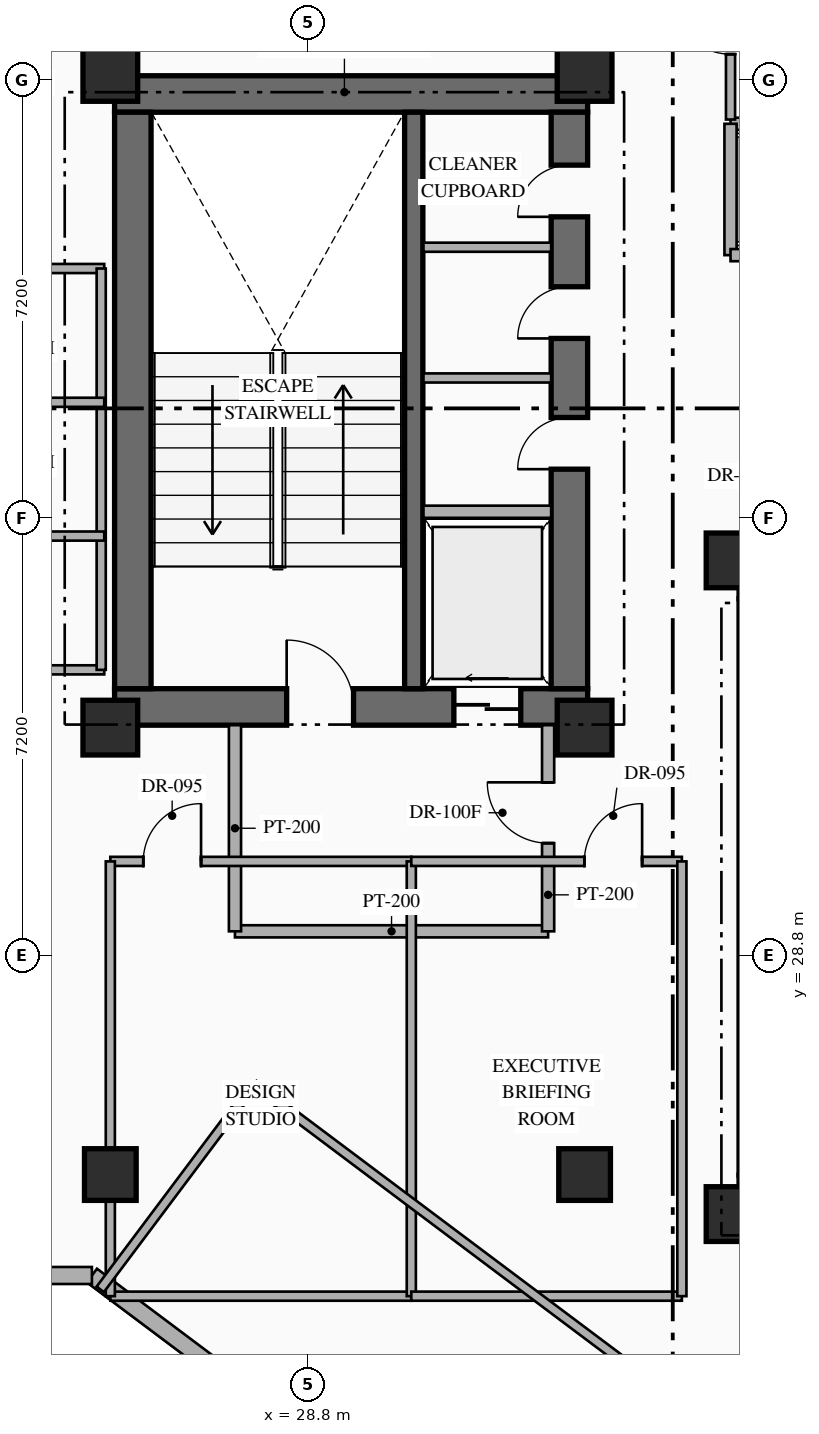
"""IFC4 building model, lengths in metres.
Left out: names, types, materials, properties, quantities, classifications, styles, units other than length and angle.
Written with IfcOpenShell. Run it as: python <this file> out.ifc"""

import sys

from ifc_helpers import new_model, si_unit, direction, frame, frame_2d, origin, origin_2d, place, context, subcontext, project, spatial, rectangle, hollow_rectangle, extrude, element, fill, save


model = new_model("IFC4")
c1 = context("Model", 3, precision=1e-05, world=origin(), true_north=direction((0.0, 1.0)))
c2 = subcontext(c1, "Body", "Model", "MODEL_VIEW")
j1 = project(units=[si_unit("LENGTHUNIT", "METRE"), si_unit("PLANEANGLEUNIT", "RADIAN")], contexts=[c1])
p1 = place(None, origin())
s1 = spatial("IfcSite", under=j1, at=p1, CompositionType="ELEMENT")
p2 = place(p1, origin())
s2 = spatial("IfcBuilding", under=s1, at=p2, CompositionType="ELEMENT")
p3 = place(p2, frame((0.0, 0.0, 149.25)))
s3 = spatial("IfcBuildingStorey", under=s2, at=p3, CompositionType="ELEMENT", Elevation=149.25)
p4 = place(p3, frame((25.62, 32.89, 0.0), z_axis=(0.0, 0.0, 1.0), x_axis=(1.0, 0.0, 0.0)))
e1 = element("IfcWall", 1, at=p4, inside=s3, PredefinedType="SHEAR", context=c2, shape_type="SweptSolid", body=[
    extrude(rectangle(XDim=7.78, YDim=0.6, at=frame_2d((3.89, 0.0))), origin(), (0.0, 0.0, 1.0), 3.6),
])
p5 = place(p4, frame((2.83, 0.0, 0.0)))
e2 = element("IfcOpeningElement", 2, at=p5, cuts=e1, PredefinedType="OPENING", context=c2, shape_type="SweptSolid", body=[
    extrude(rectangle(XDim=1.1, YDim=2.2, at=frame_2d((0.55, 1.1))), frame((0.0, 0.31, 0.0), z_axis=(0.0, -1.0, 0.0), x_axis=(1.0, 0.0, 0.0)), (0.0, 0.0, 1.0), 0.62),
])
p6 = place(p4, frame((5.58, 0.0, 0.0)))
e3 = element("IfcOpeningElement", 3, at=p6, cuts=e1, PredefinedType="OPENING", context=c2, shape_type="SweptSolid", body=[
    extrude(rectangle(XDim=1.1, YDim=2.15, at=frame_2d((0.55, 1.075))), frame((0.0, 0.31, 0.0), z_axis=(0.0, -1.0, 0.0), x_axis=(1.0, 0.0, 0.0)), (0.0, 0.0, 1.0), 0.62),
])
p7 = place(p3, frame((25.62, 42.97, 0.0), z_axis=(0.0, 0.0, 1.0), x_axis=(1.0, 0.0, 0.0)))
e4 = element("IfcWall", 4, at=p7, inside=s3, PredefinedType="SHEAR", context=c2, shape_type="SweptSolid", body=[
    extrude(rectangle(XDim=7.78, YDim=0.6, at=frame_2d((3.89, 0.0))), origin(), (0.0, 0.0, 1.0), 3.6),
])
p8 = place(p3, frame((25.92, 33.19, 0.0), z_axis=(0.0, 0.0, 1.0), x_axis=(0.0, 1.0, 0.0)))
e5 = element("IfcWall", 5, at=p8, inside=s3, PredefinedType="SHEAR", context=c2, shape_type="SweptSolid", body=[
    extrude(rectangle(XDim=9.48, YDim=0.6, at=frame_2d((4.74, 0.0))), origin(), (0.0, 0.0, 1.0), 3.6),
])
p9 = place(p3, frame((33.1, 33.19, 0.0), z_axis=(0.0, 0.0, 1.0), x_axis=(0.0, 1.0, 0.0)))
e6 = element("IfcWall", 6, at=p9, inside=s3, PredefinedType="SHEAR", context=c2, shape_type="SweptSolid", body=[
    extrude(rectangle(XDim=9.48, YDim=0.6, at=frame_2d((4.74, 0.0))), origin(), (0.0, 0.0, 1.0), 3.6),
])
p10 = place(p9, frame((3.61, 0.0, 0.0)))
e7 = element("IfcOpeningElement", 7, at=p10, cuts=e6, PredefinedType="OPENING", context=c2, shape_type="SweptSolid", body=[
    extrude(rectangle(XDim=0.85, YDim=2.08, at=frame_2d((0.425, 1.04))), frame((0.0, 0.31, 0.0), z_axis=(0.0, -1.0, 0.0), x_axis=(1.0, 0.0, 0.0)), (0.0, 0.0, 1.0), 0.62),
])
p11 = place(p9, frame((5.76, 0.0, 0.0)))
e8 = element("IfcOpeningElement", 8, at=p11, cuts=e6, PredefinedType="OPENING", context=c2, shape_type="SweptSolid", body=[
    extrude(rectangle(XDim=0.85, YDim=2.08, at=frame_2d((0.425, 1.04))), frame((0.0, 0.31, 0.0), z_axis=(0.0, -1.0, 0.0), x_axis=(1.0, 0.0, 0.0)), (0.0, 0.0, 1.0), 0.62),
])
p12 = place(p9, frame((7.76, 0.0, 0.0)))
e9 = element("IfcOpeningElement", 9, at=p12, cuts=e6, PredefinedType="OPENING", context=c2, shape_type="SweptSolid", body=[
    extrude(rectangle(XDim=0.85, YDim=2.08, at=frame_2d((0.425, 1.04))), frame((0.0, 0.31, 0.0), z_axis=(0.0, -1.0, 0.0), x_axis=(1.0, 0.0, 0.0)), (0.0, 0.0, 1.0), 0.62),
])
p13 = place(p3, frame((30.54, 33.19, 0.0), z_axis=(0.0, 0.0, 1.0), x_axis=(0.0, 1.0, 0.0)))
e10 = element("IfcWall", 10, at=p13, inside=s3, PredefinedType="SHEAR", context=c2, shape_type="SweptSolid", body=[
    extrude(rectangle(XDim=9.48, YDim=0.3, at=frame_2d((4.74, 0.0))), origin(), (0.0, 0.0, 1.0), 3.6),
])
p14 = place(p3, frame((35.89, 24.89, 0.0), z_axis=(0.0, 0.0, 1.0), x_axis=(1.0, 0.0, 0.0)))
e11 = element("IfcWall", 11, at=p14, inside=s3, PredefinedType="SHEAR", context=c2, shape_type="SweptSolid", body=[
    extrude(rectangle(XDim=7.76, YDim=0.6, at=frame_2d((3.88, 0.0))), origin(), (0.0, 0.0, 1.0), 3.6),
])
p15 = place(p3, frame((35.89, 34.97, 0.0), z_axis=(0.0, 0.0, 1.0), x_axis=(1.0, 0.0, 0.0)))
e12 = element("IfcWall", 12, at=p15, inside=s3, PredefinedType="SHEAR", context=c2, shape_type="SweptSolid", body=[
    extrude(rectangle(XDim=7.76, YDim=0.6, at=frame_2d((3.88, 0.0))), origin(), (0.0, 0.0, 1.0), 3.6),
])
p16 = place(p15, frame((2.66, 0.0, 0.0)))
e13 = element("IfcOpeningElement", 13, at=p16, cuts=e12, PredefinedType="OPENING", context=c2, shape_type="SweptSolid", body=[
    extrude(rectangle(XDim=1.1, YDim=2.2, at=frame_2d((0.55, 1.1))), frame((0.0, 0.31, 0.0), z_axis=(0.0, -1.0, 0.0), x_axis=(1.0, 0.0, 0.0)), (0.0, 0.0, 1.0), 0.62),
])
p17 = place(p15, frame((5.56, 0.0, 0.0)))
e14 = element("IfcOpeningElement", 14, at=p17, cuts=e12, PredefinedType="OPENING", context=c2, shape_type="SweptSolid", body=[
    extrude(rectangle(XDim=1.12, YDim=2.15, at=frame_2d((0.56, 1.075))), frame((0.0, 0.31, 0.0), z_axis=(0.0, -1.0, 0.0), x_axis=(1.0, 0.0, 0.0)), (0.0, 0.0, 1.0), 0.62),
])
p18 = place(p3, frame((36.19, 25.19, 0.0), z_axis=(0.0, 0.0, 1.0), x_axis=(0.0, 1.0, 0.0)))
e15 = element("IfcWall", 15, at=p18, inside=s3, PredefinedType="SHEAR", context=c2, shape_type="SweptSolid", body=[
    extrude(rectangle(XDim=9.48, YDim=0.6, at=frame_2d((4.74, 0.0))), origin(), (0.0, 0.0, 1.0), 3.6),
])
for number, where, z_axis, x_axis in (
    (16, (25.55, 32.55, 0.0), (0.0, 0.0, 1.0), (1.0, 0.0, 0.0)),
    (17, (33.35, 32.55, 0.0), (0.0, 0.0, 1.0), (1.0, 0.0, 0.0)),
    (18, (25.55, 43.3, 0.0), (0.0, 0.0, 1.0), (1.0, 0.0, 0.0)),
    (19, (33.35, 43.3, 0.0), (0.0, 0.0, 1.0), (1.0, 0.0, 0.0)),
    (20, (35.8, 24.55, 0.0), (0.0, 0.0, 1.0), (1.0, 0.0, 0.0)),
    (21, (35.8, 35.3, 0.0), (0.0, 0.0, 1.0), (1.0, 0.0, 0.0)),
):
    element("IfcColumn", number, at=place(p3, frame(where, z_axis=z_axis, x_axis=x_axis)), inside=s3, PredefinedType="COLUMN", context=c2, shape_type="SweptSolid", body=[
        extrude(rectangle(XDim=0.9, YDim=0.9, at=origin_2d()), origin(), (0.0, 0.0, 1.0), 3.6),
    ])
for number, where, z_axis, x_axis in (
    (22, (25.55, 25.2, 0.0), (0.0, 0.0, 1.0), (1.0, 0.0, 0.0)),
    (23, (33.35, 25.2, 0.0), (0.0, 0.0, 1.0), (1.0, 0.0, 0.0)),
):
    element("IfcColumn", number, at=place(p3, frame(where, z_axis=z_axis, x_axis=x_axis)), inside=s3, PredefinedType="COLUMN", context=c2, shape_type="SweptSolid", body=[
        extrude(hollow_rectangle(XDim=0.85, YDim=0.85, WallThickness=0.032, at=origin_2d()), origin(), (0.0, 0.0, 1.0), 3.6),
    ])
p19 = place(p3, frame((44.918, 8.787, 0.0), z_axis=(0.0, 0.0, 1.0), x_axis=(-0.800004765927, 0.599993645378, 0.0)))
e24 = element("IfcWall", 24, at=p19, inside=s3, PredefinedType="STANDARD", context=c2, shape_type="SweptSolid", body=[
    extrude(rectangle(XDim=24.588, YDim=0.28, at=frame_2d((12.294, 0.0))), origin(), (0.0, 0.0, 1.0), 3.35),
])
p20 = place(p3, frame((25.247, 23.54, 0.0), z_axis=(0.0, 0.0, 1.0), x_axis=(-1.0, 0.0, 0.0)))
e25 = element("IfcWall", 25, at=p20, inside=s3, PredefinedType="STANDARD", context=c2, shape_type="SweptSolid", body=[
    extrude(rectangle(XDim=6.747, YDim=0.28, at=frame_2d((3.374, 0.0))), origin(), (0.0, 0.0, 1.0), 3.35),
])
p21 = place(p3, frame((30.7, 36.1, 0.0), z_axis=(0.0, 0.0, 1.0), x_axis=(1.0, 0.0, 0.0)))
e26 = element("IfcWall", 26, at=p21, inside=s3, PredefinedType="STANDARD", context=c2, shape_type="SweptSolid", body=[
    extrude(rectangle(XDim=2.1, YDim=0.2, at=frame_2d((1.05, 0.0))), origin(), (0.0, 0.0, 1.0), 3.35),
])
for number, where, z_axis, x_axis in (
    (27, (30.7, 38.3, 0.0), (0.0, 0.0, 1.0), (1.0, 0.0, 0.0)),
    (28, (30.7, 40.45, 0.0), (0.0, 0.0, 1.0), (1.0, 0.0, 0.0)),
):
    element("IfcWall", number, at=place(p3, frame(where, z_axis=z_axis, x_axis=x_axis)), inside=s3, PredefinedType="PARTITIONING", context=c2, shape_type="SweptSolid", body=[
        extrude(rectangle(XDim=2.1, YDim=0.15, at=frame_2d((1.05, 0.0))), origin(), (0.0, 0.0, 1.0), 3.35),
    ])
p22 = place(p3, frame((27.6, 29.2, 0.0), z_axis=(0.0, 0.0, 1.0), x_axis=(1.0, 0.0, 0.0)))
e29 = element("IfcWall", 29, at=p22, inside=s3, PredefinedType="STANDARD", context=c2, shape_type="SweptSolid", body=[
    extrude(rectangle(XDim=5.15, YDim=0.2, at=frame_2d((2.575, 0.0))), origin(), (0.0, 0.0, 1.0), 3.35),
])
p23 = place(p3, frame((27.6, 29.2, 0.0), z_axis=(0.0, 0.0, 1.0), x_axis=(0.0, 1.0, 0.0)))
e30 = element("IfcWall", 30, at=p23, inside=s3, PredefinedType="STANDARD", context=c2, shape_type="SweptSolid", body=[
    extrude(rectangle(XDim=3.39, YDim=0.2, at=frame_2d((1.695, 0.0))), origin(), (0.0, 0.0, 1.0), 3.35),
])
p24 = place(p3, frame((32.75, 29.2, 0.0), z_axis=(0.0, 0.0, 1.0), x_axis=(0.0, 1.0, 0.0)))
e31 = element("IfcWall", 31, at=p24, inside=s3, PredefinedType="STANDARD", context=c2, shape_type="SweptSolid", body=[
    extrude(rectangle(XDim=3.39, YDim=0.2, at=frame_2d((1.695, 0.0))), origin(), (0.0, 0.0, 1.0), 3.35),
])
p25 = place(p24, frame((1.45, 0.0, 0.0)))
e32 = element("IfcOpeningElement", 32, at=p25, cuts=e31, PredefinedType="OPENING", context=c2, shape_type="SweptSolid", body=[
    extrude(rectangle(XDim=1.0, YDim=2.2, at=frame_2d((0.5, 1.1))), frame((0.0, 0.11, 0.0), z_axis=(0.0, -1.0, 0.0), x_axis=(1.0, 0.0, 0.0)), (0.0, 0.0, 1.0), 0.22),
])
p26 = place(p3, frame((35.75, 42.48, 0.0), z_axis=(0.0, 0.0, 1.0), x_axis=(1.0, 0.0, 0.0)))
e33 = element("IfcWall", 33, at=p26, inside=s3, PredefinedType="STANDARD", context=c2, shape_type="SweptSolid", body=[
    extrude(rectangle(XDim=9.11, YDim=0.2, at=frame_2d((4.555, 0.0))), origin(), (0.0, 0.0, 1.0), 3.35),
])
p27 = place(p3, frame((35.75, 40.32, 0.0), z_axis=(0.0, 0.0, 1.0), x_axis=(0.0, 1.0, 0.0)))
e34 = element("IfcWall", 34, at=p27, inside=s3, PredefinedType="STANDARD", context=c2, shape_type="SweptSolid", body=[
    extrude(rectangle(XDim=2.16, YDim=0.2, at=frame_2d((1.08, 0.0))), origin(), (0.0, 0.0, 1.0), 3.35),
])
p28 = place(p3, frame((35.75, 40.32, 0.0), z_axis=(0.0, 0.0, 1.0), x_axis=(1.0, 0.0, 0.0)))
e35 = element("IfcWall", 35, at=p28, inside=s3, PredefinedType="STANDARD", context=c2, shape_type="SweptSolid", body=[
    extrude(rectangle(XDim=9.11, YDim=0.2, at=frame_2d((4.555, 0.0))), origin(), (0.0, 0.0, 1.0), 3.35),
])
p29 = place(p28, frame((0.53, 0.0, 0.0)))
e36 = element("IfcOpeningElement", 36, at=p29, cuts=e35, PredefinedType="OPENING", context=c2, shape_type="SweptSolid", body=[
    extrude(rectangle(XDim=1.1, YDim=2.18, at=frame_2d((0.55, 1.09))), frame((0.0, 0.11, 0.0), z_axis=(0.0, -1.0, 0.0), x_axis=(1.0, 0.0, 0.0)), (0.0, 0.0, 1.0), 0.22),
])
p30 = place(p28, frame((2.73, 0.0, 0.0)))
e37 = element("IfcOpeningElement", 37, at=p30, cuts=e35, PredefinedType="OPENING", context=c2, shape_type="SweptSolid", body=[
    extrude(rectangle(XDim=1.1, YDim=2.18, at=frame_2d((0.55, 1.09))), frame((0.0, 0.11, 0.0), z_axis=(0.0, -1.0, 0.0), x_axis=(1.0, 0.0, 0.0)), (0.0, 0.0, 1.0), 0.22),
])
p31 = place(p28, frame((4.93, 0.0, 0.0)))
e38 = element("IfcOpeningElement", 38, at=p31, cuts=e35, PredefinedType="OPENING", context=c2, shape_type="SweptSolid", body=[
    extrude(rectangle(XDim=1.1, YDim=2.18, at=frame_2d((0.55, 1.09))), frame((0.0, 0.11, 0.0), z_axis=(0.0, -1.0, 0.0), x_axis=(1.0, 0.0, 0.0)), (0.0, 0.0, 1.0), 0.22),
])
p32 = place(p28, frame((7.13, 0.0, 0.0)))
e39 = element("IfcOpeningElement", 39, at=p32, cuts=e35, PredefinedType="OPENING", context=c2, shape_type="SweptSolid", body=[
    extrude(rectangle(XDim=1.1, YDim=2.18, at=frame_2d((0.55, 1.09))), frame((0.0, 0.11, 0.0), z_axis=(0.0, -1.0, 0.0), x_axis=(1.0, 0.0, 0.0)), (0.0, 0.0, 1.0), 0.22),
])
for number, where, z_axis, x_axis in (
    (40, (22.15, 33.5, 0.0), (0.0, 0.0, 1.0), (1.0, 0.0, 0.0)),
    (41, (22.15, 40.1, 0.0), (0.0, 0.0, 1.0), (1.0, 0.0, 0.0)),
):
    element("IfcWall", number, at=place(p3, frame(where, z_axis=z_axis, x_axis=x_axis)), inside=s3, PredefinedType="PARTITIONING", context=c2, shape_type="SweptSolid", body=[
        extrude(rectangle(XDim=3.3, YDim=0.15, at=frame_2d((1.65, 0.0))), origin(), (0.0, 0.0, 1.0), 3.35),
    ])
p33 = place(p3, frame((25.4, 33.5, 0.0), z_axis=(0.0, 0.0, 1.0), x_axis=(0.0, 1.0, 0.0)))
e42 = element("IfcWall", 42, at=p33, inside=s3, PredefinedType="PARTITIONING", context=c2, shape_type="SweptSolid", body=[
    extrude(rectangle(XDim=6.6, YDim=0.15, at=frame_2d((3.3, 0.0))), origin(), (0.0, 0.0, 1.0), 3.35),
])
for number, where, z_axis, x_axis in (
    (43, (22.15, 35.7, 0.0), (0.0, 0.0, 1.0), (1.0, 0.0, 0.0)),
    (44, (22.15, 37.9, 0.0), (0.0, 0.0, 1.0), (1.0, 0.0, 0.0)),
):
    element("IfcWall", number, at=place(p3, frame(where, z_axis=z_axis, x_axis=x_axis)), inside=s3, PredefinedType="PARTITIONING", context=c2, shape_type="SweptSolid", body=[
        extrude(rectangle(XDim=3.3, YDim=0.15, at=frame_2d((1.65, 0.0))), origin(), (0.0, 0.0, 1.0), 3.35),
    ])
p34 = place(p3, frame((25.55, 23.2, 0.0), z_axis=(0.0, 0.0, 1.0), x_axis=(1.0, 0.0, 0.0)))
e45 = element("IfcWall", 45, at=p34, inside=s3, PredefinedType="PARTITIONING", context=c2, shape_type="SweptSolid", body=[
    extrude(rectangle(XDim=4.95, YDim=0.15, at=frame_2d((2.475, 0.0))), origin(), (0.0, 0.0, 1.0), 3.35),
])
p35 = place(p3, frame((25.55, 30.35, 0.0), z_axis=(0.0, 0.0, 1.0), x_axis=(1.0, 0.0, 0.0)))
e46 = element("IfcWall", 46, at=p35, inside=s3, PredefinedType="PARTITIONING", context=c2, shape_type="SweptSolid", body=[
    extrude(rectangle(XDim=4.95, YDim=0.15, at=frame_2d((2.475, 0.0))), origin(), (0.0, 0.0, 1.0), 3.35),
])
p36 = place(p35, frame((0.542, 0.0, 0.0)))
e47 = element("IfcOpeningElement", 47, at=p36, cuts=e46, PredefinedType="OPENING", context=c2, shape_type="SweptSolid", body=[
    extrude(rectangle(XDim=0.95, YDim=2.15, at=frame_2d((0.475, 1.075))), frame((0.0, 0.085, 0.0), z_axis=(0.0, -1.0, 0.0), x_axis=(1.0, 0.0, 0.0)), (0.0, 0.0, 1.0), 0.17),
])
p37 = place(p3, frame((25.55, 23.2, 0.0), z_axis=(0.0, 0.0, 1.0), x_axis=(0.0, 1.0, 0.0)))
e48 = element("IfcWall", 48, at=p37, inside=s3, PredefinedType="PARTITIONING", context=c2, shape_type="SweptSolid", body=[
    extrude(rectangle(XDim=7.15, YDim=0.15, at=frame_2d((3.575, 0.0))), origin(), (0.0, 0.0, 1.0), 2.695),
])
p38 = place(p3, frame((30.5, 23.2, 0.0), z_axis=(0.0, 0.0, 1.0), x_axis=(0.0, 1.0, 0.0)))
e49 = element("IfcWall", 49, at=p38, inside=s3, PredefinedType="PARTITIONING", context=c2, shape_type="SweptSolid", body=[
    extrude(rectangle(XDim=7.15, YDim=0.15, at=frame_2d((3.575, 0.0))), origin(), (0.0, 0.0, 1.0), 3.35),
])
p39 = place(p3, frame((30.5, 23.2, 0.0), z_axis=(0.0, 0.0, 1.0), x_axis=(1.0, 0.0, 0.0)))
e50 = element("IfcWall", 50, at=p39, inside=s3, PredefinedType="PARTITIONING", context=c2, shape_type="SweptSolid", body=[
    extrude(rectangle(XDim=4.45, YDim=0.15, at=frame_2d((2.225, 0.0))), origin(), (0.0, 0.0, 1.0), 3.35),
])
p40 = place(p3, frame((30.5, 30.35, 0.0), z_axis=(0.0, 0.0, 1.0), x_axis=(1.0, 0.0, 0.0)))
e51 = element("IfcWall", 51, at=p40, inside=s3, PredefinedType="PARTITIONING", context=c2, shape_type="SweptSolid", body=[
    extrude(rectangle(XDim=4.45, YDim=0.15, at=frame_2d((2.225, 0.0))), origin(), (0.0, 0.0, 1.0), 3.35),
])
p41 = place(p40, frame((2.846, 0.0, 0.0)))
e52 = element("IfcOpeningElement", 52, at=p41, cuts=e51, PredefinedType="OPENING", context=c2, shape_type="SweptSolid", body=[
    extrude(rectangle(XDim=0.95, YDim=2.15, at=frame_2d((0.475, 1.075))), frame((0.0, 0.085, 0.0), z_axis=(0.0, -1.0, 0.0), x_axis=(1.0, 0.0, 0.0)), (0.0, 0.0, 1.0), 0.17),
])
p42 = place(p3, frame((34.95, 23.2, 0.0), z_axis=(0.0, 0.0, 1.0), x_axis=(0.0, 1.0, 0.0)))
e53 = element("IfcWall", 53, at=p42, inside=s3, PredefinedType="PARTITIONING", context=c2, shape_type="SweptSolid", body=[
    extrude(rectangle(XDim=7.15, YDim=0.15, at=frame_2d((3.575, 0.0))), origin(), (0.0, 0.0, 1.0), 3.35),
])
p43 = place(p3, frame((35.75, 42.55, 0.0), z_axis=(0.0, 0.0, 1.0), x_axis=(0.0, 1.0, 0.0)))
e54 = element("IfcWall", 54, at=p43, inside=s3, PredefinedType="PARTITIONING", context=c2, shape_type="SweptSolid", body=[
    extrude(rectangle(XDim=3.1, YDim=0.15, at=frame_2d((1.55, 0.0))), origin(), (0.0, 0.0, 1.0), 3.35),
])
p44 = place(p43, frame((1.075, 0.0, 0.0)))
e55 = element("IfcOpeningElement", 55, at=p44, cuts=e54, PredefinedType="OPENING", context=c2, shape_type="SweptSolid", body=[
    extrude(rectangle(XDim=0.95, YDim=2.15, at=frame_2d((0.475, 1.075))), frame((0.0, 0.085, 0.0), z_axis=(0.0, -1.0, 0.0), x_axis=(1.0, 0.0, 0.0)), (0.0, 0.0, 1.0), 0.17),
])
p45 = place(p3, frame((27.91, 26.68, 0.0), z_axis=(0.0, 0.0, 1.0), x_axis=(0.800005938517, -0.599992081896, 0.0)))
e56 = element("IfcWall", 56, at=p45, inside=s3, PredefinedType="PARTITIONING", context=c2, shape_type="SweptSolid", body=[
    extrude(rectangle(XDim=14.8, YDim=0.15, at=frame_2d((7.4, 0.0))), origin(), (0.0, 0.0, 1.0), 3.35),
])
p46 = place(p45, frame((9.281, 0.0, 0.0)))
e57 = element("IfcOpeningElement", 57, at=p46, cuts=e56, PredefinedType="OPENING", context=c2, shape_type="SweptSolid", body=[
    extrude(rectangle(XDim=0.95, YDim=2.15, at=frame_2d((0.475, 1.075))), frame((0.0, 0.085, 0.0), z_axis=(0.0, -1.0, 0.0), x_axis=(1.0, 0.0, 0.0)), (0.0, 0.0, 1.0), 0.17),
])
p47 = place(p3, frame((25.384, 23.312, 0.0), z_axis=(0.0, 0.0, 1.0), x_axis=(0.599990721155, 0.80000695905, 0.0)))
e58 = element("IfcWall", 58, at=p47, inside=s3, PredefinedType="PARTITIONING", context=c2, shape_type="SweptSolid", body=[
    extrude(rectangle(XDim=4.21, YDim=0.15, at=frame_2d((2.105, 0.0))), origin(), (0.0, 0.0, 1.0), 3.35),
])
p48 = place(p5, origin())
e59 = element("IfcDoor", 59, at=p48, inside=s3, OperationType="SINGLE_SWING_LEFT", PredefinedType="DOOR", context=c2, shape_type="SweptSolid", body=[
    extrude(rectangle(XDim=1.1, YDim=2.2, at=frame_2d((0.55, 1.1))), frame((0.0, 0.025, 0.0), z_axis=(0.0, -1.0, 0.0), x_axis=(1.0, 0.0, 0.0)), (0.0, 0.0, 1.0), 0.05),
])
fill(e2, e59)
p49 = place(p6, origin())
e60 = element("IfcDoor", 60, at=p49, inside=s3, OperationType="SLIDING_TO_LEFT", PredefinedType="USERDEFINED", context=c2, shape_type="SweptSolid", body=[
    extrude(rectangle(XDim=1.1, YDim=2.15, at=frame_2d((0.55, 1.075))), frame((0.0, 0.025, 0.0), z_axis=(0.0, -1.0, 0.0), x_axis=(1.0, 0.0, 0.0)), (0.0, 0.0, 1.0), 0.05),
])
fill(e3, e60)
p50 = place(p10, origin())
e61 = element("IfcDoor", 61, at=p50, inside=s3, OperationType="SINGLE_SWING_LEFT", PredefinedType="DOOR", context=c2, shape_type="SweptSolid", body=[
    extrude(rectangle(XDim=0.85, YDim=2.08, at=frame_2d((0.425, 1.04))), frame((0.0, 0.025, 0.0), z_axis=(0.0, -1.0, 0.0), x_axis=(1.0, 0.0, 0.0)), (0.0, 0.0, 1.0), 0.05),
])
fill(e7, e61)
p51 = place(p11, origin())
e62 = element("IfcDoor", 62, at=p51, inside=s3, OperationType="SINGLE_SWING_LEFT", PredefinedType="DOOR", context=c2, shape_type="SweptSolid", body=[
    extrude(rectangle(XDim=0.85, YDim=2.08, at=frame_2d((0.425, 1.04))), frame((0.0, 0.025, 0.0), z_axis=(0.0, -1.0, 0.0), x_axis=(1.0, 0.0, 0.0)), (0.0, 0.0, 1.0), 0.05),
])
fill(e8, e62)
p52 = place(p12, origin())
e63 = element("IfcDoor", 63, at=p52, inside=s3, OperationType="SINGLE_SWING_LEFT", PredefinedType="DOOR", context=c2, shape_type="SweptSolid", body=[
    extrude(rectangle(XDim=0.85, YDim=2.08, at=frame_2d((0.425, 1.04))), frame((0.0, 0.025, 0.0), z_axis=(0.0, -1.0, 0.0), x_axis=(1.0, 0.0, 0.0)), (0.0, 0.0, 1.0), 0.05),
])
fill(e9, e63)
p53 = place(p25, origin())
e64 = element("IfcDoor", 64, at=p53, inside=s3, OperationType="SINGLE_SWING_RIGHT", PredefinedType="DOOR", context=c2, shape_type="SweptSolid", body=[
    extrude(rectangle(XDim=1.0, YDim=2.2, at=frame_2d((0.5, 1.1))), frame((0.0, 0.025, 0.0), z_axis=(0.0, -1.0, 0.0), x_axis=(1.0, 0.0, 0.0)), (0.0, 0.0, 1.0), 0.05),
])
fill(e32, e64)
p54 = place(p36, origin())
e65 = element("IfcDoor", 65, at=p54, inside=s3, OperationType="SINGLE_SWING_RIGHT", PredefinedType="DOOR", context=c2, shape_type="SweptSolid", body=[
    extrude(rectangle(XDim=0.95, YDim=2.15, at=frame_2d((0.475, 1.075))), frame((0.0, 0.025, 0.0), z_axis=(0.0, -1.0, 0.0), x_axis=(1.0, 0.0, 0.0)), (0.0, 0.0, 1.0), 0.05),
])
fill(e47, e65)
p55 = place(p41, origin())
e66 = element("IfcDoor", 66, at=p55, inside=s3, OperationType="SINGLE_SWING_RIGHT", PredefinedType="DOOR", context=c2, shape_type="SweptSolid", body=[
    extrude(rectangle(XDim=0.95, YDim=2.15, at=frame_2d((0.475, 1.075))), frame((0.0, 0.025, 0.0), z_axis=(0.0, -1.0, 0.0), x_axis=(1.0, 0.0, 0.0)), (0.0, 0.0, 1.0), 0.05),
])
fill(e52, e66)
p56 = place(p44, origin())
e67 = element("IfcDoor", 67, at=p56, inside=s3, OperationType="SINGLE_SWING_RIGHT", PredefinedType="DOOR", context=c2, shape_type="SweptSolid", body=[
    extrude(rectangle(XDim=0.95, YDim=2.15, at=frame_2d((0.475, 1.075))), frame((0.0, 0.025, 0.0), z_axis=(0.0, -1.0, 0.0), x_axis=(1.0, 0.0, 0.0)), (0.0, 0.0, 1.0), 0.05),
])
fill(e55, e67)
save(model, sys.argv[1])
